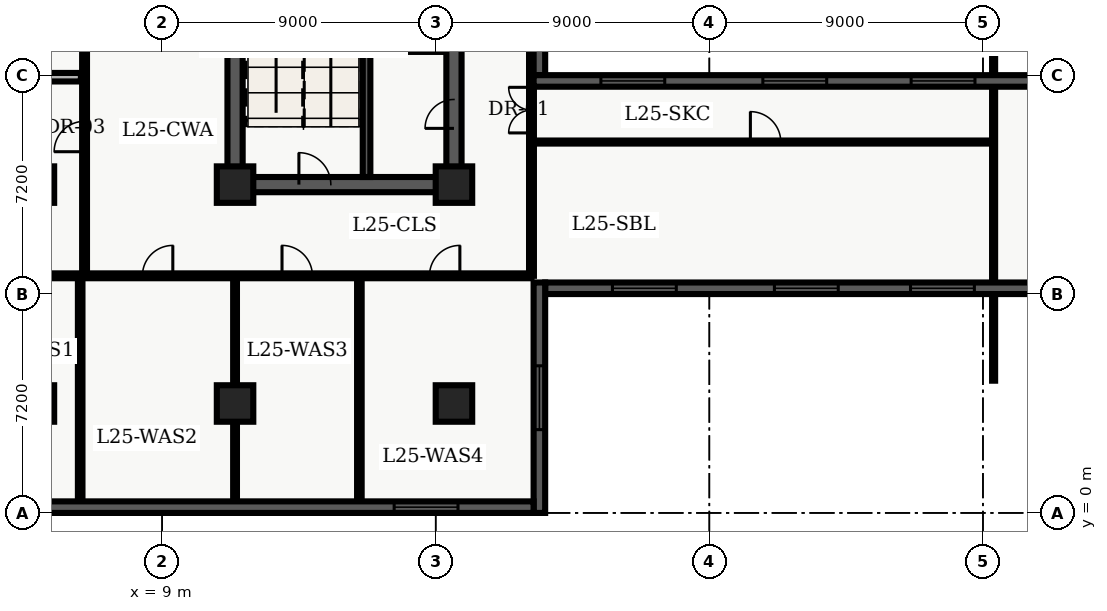
"""IFC4 building model, lengths in metres.
Left out: names, types, materials, properties, quantities, classifications, styles, units other than length and angle.
Written with IfcOpenShell. Run it as: python <this file> out.ifc"""

import sys

from ifc_helpers import new_model, entity, si_unit, converted_unit, direction, frame, origin_with_axes, origin_2d_with_axis, place, context, subcontext, project, spatial, polyline, rectangle, outline, extrude, element, fill, save


model = new_model("IFC4")
c1 = context("Model", 3, precision=1e-05, world=origin_with_axes(), true_north=direction((0.0, 1.0)))
c2 = subcontext(c1, "Body", "Model", "MODEL_VIEW")
j1 = project(units=[si_unit("LENGTHUNIT", "METRE"), converted_unit("PLANEANGLEUNIT", "DEGREE", entity("IfcPlaneAngleMeasure", 0.017), si_unit("PLANEANGLEUNIT", "RADIAN"), dimensions=[0, 0, 0, 0, 0, 0, 0])], contexts=[c1])
p1 = place(None, origin_with_axes())
s1 = spatial("IfcSite", under=j1, at=p1, CompositionType="ELEMENT")
p2 = place(p1, origin_with_axes())
s2 = spatial("IfcBuilding", under=s1, at=p2, CompositionType="ELEMENT")
p3 = place(p2, frame((0.0, 0.0, 104.7), z_axis=(0.0, 0.0, 1.0), x_axis=(1.0, 0.0, 0.0)))
s3 = spatial("IfcBuildingStorey", under=s2, at=p3, CompositionType="ELEMENT", Elevation=104.7)
p4 = place(p3, frame((11.4, 10.8, 0.0), z_axis=(0.0, 0.0, 1.0), x_axis=(0.0, 1.0, 0.0)))
e1 = element("IfcWall", 1, at=p4, inside=s3, PredefinedType="SHEAR", context=c2, shape_type="SweptSolid", body=[
    extrude(outline(polyline([(0.0, -0.25), (27.0, -0.25), (27.0, 0.25), (0.0, 0.25), (0.0, -0.25)])), origin_with_axes(), (0.0, 0.0, 1.0), 3.66),
])
p5 = place(p3, frame((11.4, 10.8, 0.0), z_axis=(0.0, 0.0, 1.0), x_axis=(1.0, 0.0, 0.0)))
e2 = element("IfcWall", 2, at=p5, inside=s3, PredefinedType="SHEAR", context=c2, shape_type="SweptSolid", body=[
    extrude(outline(polyline([(0.0, -0.25), (7.2, -0.25), (7.2, 0.25), (0.0, 0.25), (0.0, -0.25)])), origin_with_axes(), (0.0, 0.0, 1.0), 3.66),
])
p6 = place(p5, frame((2.625, 0.0, 0.0), z_axis=(0.0, 0.0, 1.0), x_axis=(1.0, 0.0, 0.0)))
e3 = element("IfcOpeningElement", 3, at=p6, cuts=e2, PredefinedType="OPENING", context=c2, shape_type="SweptSolid", body=[
    extrude(rectangle(XDim=1.05, YDim=0.52, at=origin_2d_with_axis()), origin_with_axes(), (0.0, 0.0, 1.0), 2.15),
])
p7 = place(p3, frame((18.6, 10.8, 0.0), z_axis=(0.0, 0.0, 1.0), x_axis=(0.0, 1.0, 0.0)))
e4 = element("IfcWall", 4, at=p7, inside=s3, PredefinedType="SHEAR", context=c2, shape_type="SweptSolid", body=[
    extrude(outline(polyline([(0.0, -0.25), (13.5, -0.25), (13.5, 0.25), (0.0, 0.25), (0.0, -0.25)])), origin_with_axes(), (0.0, 0.0, 1.0), 3.66),
])
p8 = place(p7, frame((11.125, 0.0, 0.0), z_axis=(0.0, 0.0, 1.0), x_axis=(1.0, 0.0, 0.0)))
e5 = element("IfcOpeningElement", 5, at=p8, cuts=e4, PredefinedType="OPENING", context=c2, shape_type="SweptSolid", body=[
    extrude(rectangle(XDim=1.05, YDim=0.52, at=origin_2d_with_axis()), origin_with_axes(), (0.0, 0.0, 1.0), 2.15),
])
p9 = place(p7, frame((2.325, 0.0, 0.0), z_axis=(0.0, 0.0, 1.0), x_axis=(1.0, 0.0, 0.0)))
e6 = element("IfcOpeningElement", 6, at=p9, cuts=e4, PredefinedType="OPENING", context=c2, shape_type="SweptSolid", body=[
    extrude(rectangle(XDim=0.95, YDim=0.52, at=origin_2d_with_axis()), origin_with_axes(), (0.0, 0.0, 1.0), 2.15),
])
p10 = place(p3, frame((15.725, 11.05, 0.0), z_axis=(0.0, 0.0, 1.0), x_axis=(0.0, 1.0, 0.0)))
e7 = element("IfcWall", 7, at=p10, inside=s3, PredefinedType="SHEAR", context=c2, shape_type="SweptSolid", body=[
    extrude(outline(polyline([(0.0, -0.125), (8.65, -0.125), (8.65, 0.125), (0.0, 0.125), (0.0, -0.125)])), origin_with_axes(), (0.0, 0.0, 1.0), 3.66),
])
for number, where, z_axis, x_axis in (
    (8, (11.4, 3.6, 0.0), (0.0, 0.0, 1.0), (1.0, 0.0, 0.0)),
    (9, (11.4, 10.8, 0.0), (0.0, 0.0, 1.0), (1.0, 0.0, 0.0)),
    (10, (18.6, 3.6, 0.0), (0.0, 0.0, 1.0), (1.0, 0.0, 0.0)),
    (11, (18.6, 10.8, 0.0), (0.0, 0.0, 1.0), (1.0, 0.0, 0.0)),
    (12, (4.85, 3.6, 0.0), (0.0, 0.0, 1.0), (1.0, 0.0, 0.0)),
    (13, (4.85, 10.8, 0.0), (0.0, 0.0, 1.0), (1.0, 0.0, 0.0)),
):
    element("IfcColumn", number, at=place(p3, frame(where, z_axis=z_axis, x_axis=x_axis)), inside=s3, PredefinedType="COLUMN", context=c2, shape_type="SweptSolid", body=[
        extrude(rectangle(XDim=1.2, YDim=1.2, at=origin_2d_with_axis()), origin_with_axes(), (0.0, 0.0, 1.0), 3.9),
    ])
p11 = place(p3, frame((2.6, 7.8, 0.0), z_axis=(0.0, 0.0, 1.0), x_axis=(1.0, 0.0, 0.0)))
e14 = element("IfcWall", 14, at=p11, inside=s3, PredefinedType="PARTITIONING", context=c2, shape_type="SweptSolid", body=[
    extrude(outline(polyline([(0.0, -0.08), (18.55, -0.08), (18.55, 0.08), (0.0, 0.08), (0.0, -0.08)])), origin_with_axes(), (0.0, 0.0, 1.0), 2.7),
])
p12 = place(p11, frame((1.848, 0.0, 0.0), z_axis=(0.0, 0.0, 1.0), x_axis=(1.0, 0.0, 0.0)))
e15 = element("IfcOpeningElement", 15, at=p12, cuts=e14, PredefinedType="OPENING", context=c2, shape_type="SweptSolid", body=[
    extrude(rectangle(XDim=1.0, YDim=0.18, at=origin_2d_with_axis()), origin_with_axes(), (0.0, 0.0, 1.0), 2.15),
])
p13 = place(p11, frame((6.253, 0.0, 0.0), z_axis=(0.0, 0.0, 1.0), x_axis=(1.0, 0.0, 0.0)))
e16 = element("IfcOpeningElement", 16, at=p13, cuts=e14, PredefinedType="OPENING", context=c2, shape_type="SweptSolid", body=[
    extrude(rectangle(XDim=1.0, YDim=0.18, at=origin_2d_with_axis()), origin_with_axes(), (0.0, 0.0, 1.0), 2.15),
])
p14 = place(p11, frame((10.845, 0.0, 0.0), z_axis=(0.0, 0.0, 1.0), x_axis=(1.0, 0.0, 0.0)))
e17 = element("IfcOpeningElement", 17, at=p14, cuts=e14, PredefinedType="OPENING", context=c2, shape_type="SweptSolid", body=[
    extrude(rectangle(XDim=1.0, YDim=0.18, at=origin_2d_with_axis()), origin_with_axes(), (0.0, 0.0, 1.0), 2.15),
])
p15 = place(p11, frame((15.694, 0.0, 0.0), z_axis=(0.0, 0.0, 1.0), x_axis=(1.0, 0.0, 0.0)))
e18 = element("IfcOpeningElement", 18, at=p15, cuts=e14, PredefinedType="OPENING", context=c2, shape_type="SweptSolid", body=[
    extrude(rectangle(XDim=1.0, YDim=0.18, at=origin_2d_with_axis()), origin_with_axes(), (0.0, 0.0, 1.0), 2.15),
])
p16 = place(p3, frame((21.15, 7.8, 0.0), z_axis=(0.0, 0.0, 1.0), x_axis=(0.0, 1.0, 0.0)))
e19 = element("IfcWall", 19, at=p16, inside=s3, PredefinedType="PARTITIONING", context=c2, shape_type="SweptSolid", body=[
    extrude(outline(polyline([(0.0, -0.08), (32.7, -0.08), (32.7, 0.08), (0.0, 0.08), (0.0, -0.08)])), origin_with_axes(), (0.0, 0.0, 1.0), 2.7),
])
p17 = place(p16, frame((5.45, 0.0, 0.0), z_axis=(0.0, 0.0, 1.0), x_axis=(1.0, 0.0, 0.0)))
e20 = element("IfcOpeningElement", 20, at=p17, cuts=e19, PredefinedType="OPENING", context=c2, shape_type="SweptSolid", body=[
    extrude(rectangle(XDim=1.5, YDim=0.18, at=origin_2d_with_axis()), origin_with_axes(), (0.0, 0.0, 1.0), 2.2),
])
p18 = place(p3, frame((6.45, 7.8, 0.0), z_axis=(0.0, 0.0, 1.0), x_axis=(0.0, 1.0, 0.0)))
e21 = element("IfcWall", 21, at=p18, inside=s3, PredefinedType="PARTITIONING", context=c2, shape_type="SweptSolid", body=[
    extrude(outline(polyline([(0.0, -0.08), (32.7, -0.08), (32.7, 0.08), (0.0, 0.08), (0.0, -0.08)])), origin_with_axes(), (0.0, 0.0, 1.0), 2.7),
])
p19 = place(p18, frame((4.582, 0.0, 0.0), z_axis=(0.0, 0.0, 1.0), x_axis=(1.0, 0.0, 0.0)))
e22 = element("IfcOpeningElement", 22, at=p19, cuts=e21, PredefinedType="OPENING", context=c2, shape_type="SweptSolid", body=[
    extrude(rectangle(XDim=1.0, YDim=0.18, at=origin_2d_with_axis()), origin_with_axes(), (0.0, 0.0, 1.0), 2.15),
])
p20 = place(p18, frame((10.304, 0.0, 0.0), z_axis=(0.0, 0.0, 1.0), x_axis=(1.0, 0.0, 0.0)))
e23 = element("IfcOpeningElement", 23, at=p20, cuts=e21, PredefinedType="OPENING", context=c2, shape_type="SweptSolid", body=[
    extrude(rectangle(XDim=1.0, YDim=0.18, at=origin_2d_with_axis()), origin_with_axes(), (0.0, 0.0, 1.0), 2.15),
])
p21 = place(p18, frame((18.512, 0.0, 0.0), z_axis=(0.0, 0.0, 1.0), x_axis=(1.0, 0.0, 0.0)))
e24 = element("IfcOpeningElement", 24, at=p21, cuts=e21, PredefinedType="OPENING", context=c2, shape_type="SweptSolid", body=[
    extrude(rectangle(XDim=1.0, YDim=0.18, at=origin_2d_with_axis()), origin_with_axes(), (0.0, 0.0, 1.0), 2.15),
])
p22 = place(p18, frame((25.142, 0.0, 0.0), z_axis=(0.0, 0.0, 1.0), x_axis=(1.0, 0.0, 0.0)))
e25 = element("IfcOpeningElement", 25, at=p22, cuts=e21, PredefinedType="OPENING", context=c2, shape_type="SweptSolid", body=[
    extrude(rectangle(XDim=1.0, YDim=0.18, at=origin_2d_with_axis()), origin_with_axes(), (0.0, 0.0, 1.0), 2.15),
])
p23 = place(p18, frame((31.602, 0.0, 0.0), z_axis=(0.0, 0.0, 1.0), x_axis=(1.0, 0.0, 0.0)))
e26 = element("IfcOpeningElement", 26, at=p23, cuts=e21, PredefinedType="OPENING", context=c2, shape_type="SweptSolid", body=[
    extrude(rectangle(XDim=1.0, YDim=0.18, at=origin_2d_with_axis()), origin_with_axes(), (0.0, 0.0, 1.0), 2.15),
])
p24 = place(p3, frame((0.375, 14.333, 0.0), z_axis=(0.0, 0.0, 1.0), x_axis=(1.0, 0.0, 0.0)))
e27 = element("IfcWall", 27, at=p24, inside=s3, PredefinedType="PARTITIONING", context=c2, shape_type="SweptSolid", body=[
    extrude(outline(polyline([(0.0, -0.14), (5.955, -0.14), (5.955, 0.14), (0.0, 0.14), (0.0, -0.14)])), origin_with_axes(), (0.0, 0.0, 1.0), 2.7),
])
p25 = place(p3, frame((6.306, 0.36, 0.0), z_axis=(0.0, 0.0, 1.0), x_axis=(0.0, 1.0, 0.0)))
e28 = element("IfcWall", 28, at=p25, inside=s3, PredefinedType="PARTITIONING", context=c2, shape_type="SweptSolid", body=[
    extrude(outline(polyline([(0.0, -0.075), (7.34, -0.075), (7.34, 0.075), (0.0, 0.075), (0.0, -0.075)])), origin_with_axes(), (0.0, 0.0, 1.0), 2.7),
])
p26 = place(p3, frame((11.4, 0.36, 0.0), z_axis=(0.0, 0.0, 1.0), x_axis=(0.0, 1.0, 0.0)))
e29 = element("IfcWall", 29, at=p26, inside=s3, PredefinedType="PARTITIONING", context=c2, shape_type="SweptSolid", body=[
    extrude(outline(polyline([(0.0, -0.062), (7.34, -0.062), (7.34, 0.062), (0.0, 0.062), (0.0, -0.062)])), origin_with_axes(), (0.0, 0.0, 1.0), 2.7),
])
p27 = place(p3, frame((15.489, 0.36, 0.0), z_axis=(0.0, 0.0, 1.0), x_axis=(0.0, 1.0, 0.0)))
e30 = element("IfcWall", 30, at=p27, inside=s3, PredefinedType="PARTITIONING", context=c2, shape_type="SweptSolid", body=[
    extrude(outline(polyline([(0.0, -0.075), (7.34, -0.075), (7.34, 0.075), (0.0, 0.075), (0.0, -0.075)])), origin_with_axes(), (0.0, 0.0, 1.0), 2.7),
])
p28 = place(p3, frame((21.15, 12.2, 0.0), z_axis=(0.0, 0.0, 1.0), x_axis=(1.0, 0.0, 0.0)))
e31 = element("IfcWall", 31, at=p28, inside=s3, PredefinedType="PARTITIONING", context=c2, shape_type="SweptSolid", body=[
    extrude(outline(polyline([(0.0, -0.05), (15.2, -0.05), (15.2, 0.05), (0.0, 0.05), (0.0, -0.05)])), origin_with_axes(), (0.0, 0.0, 1.0), 2.7),
])
p29 = place(p28, frame((7.7, 0.0, 0.0), z_axis=(0.0, 0.0, 1.0), x_axis=(1.0, 0.0, 0.0)))
e32 = element("IfcOpeningElement", 32, at=p29, cuts=e31, PredefinedType="OPENING", context=c2, shape_type="SweptSolid", body=[
    extrude(rectangle(XDim=1.0, YDim=0.12, at=origin_2d_with_axis()), origin_with_axes(), (0.0, 0.0, 1.0), 2.15),
])
p30 = place(p3, frame((36.35, 4.35, 0.0), z_axis=(0.0, 0.0, 1.0), x_axis=(0.0, 1.0, 0.0)))
e33 = element("IfcWall", 33, at=p30, inside=s3, PredefinedType="PARTITIONING", context=c2, shape_type="SweptSolid", body=[
    extrude(outline(polyline([(0.0, -0.05), (22.2, -0.05), (22.2, 0.05), (0.0, 0.05), (0.0, -0.05)])), origin_with_axes(), (0.0, 0.0, 1.0), 2.7),
])
p31 = place(p3, frame((38.78, 7.39, 0.0), z_axis=(0.0, 0.0, 1.0), x_axis=(-1.0, 0.0, 0.0)))
e34 = element("IfcWall", 34, at=p31, inside=s3, PredefinedType="SOLIDWALL", context=c2, shape_type="SweptSolid", body=[
    extrude(outline(polyline([(0.0, -0.19), (17.18, -0.19), (17.18, 0.19), (0.0, 0.19), (0.0, -0.19)])), origin_with_axes(), (0.0, 0.0, 1.0), 3.66),
])
p32 = place(p31, frame((4.113, 0.0, 0.45), z_axis=(0.0, 0.0, 1.0), x_axis=(1.0, 0.0, 0.0)))
e35 = element("IfcOpeningElement", 35, at=p32, cuts=e34, PredefinedType="OPENING", context=c2, shape_type="SweptSolid", body=[
    extrude(rectangle(XDim=2.1, YDim=0.4, at=origin_2d_with_axis()), origin_with_axes(), (0.0, 0.0, 1.0), 2.2),
])
p33 = place(p31, frame((8.59, 0.0, 0.45), z_axis=(0.0, 0.0, 1.0), x_axis=(1.0, 0.0, 0.0)))
e36 = element("IfcOpeningElement", 36, at=p33, cuts=e34, PredefinedType="OPENING", context=c2, shape_type="SweptSolid", body=[
    extrude(rectangle(XDim=2.1, YDim=0.4, at=origin_2d_with_axis()), origin_with_axes(), (0.0, 0.0, 1.0), 2.2),
])
p34 = place(p31, frame((13.917, 0.0, 0.45), z_axis=(0.0, 0.0, 1.0), x_axis=(1.0, 0.0, 0.0)))
e37 = element("IfcOpeningElement", 37, at=p34, cuts=e34, PredefinedType="OPENING", context=c2, shape_type="SweptSolid", body=[
    extrude(rectangle(XDim=2.1, YDim=0.4, at=origin_2d_with_axis()), origin_with_axes(), (0.0, 0.0, 1.0), 2.2),
])
p35 = place(p3, frame((21.41, 7.58, 0.0), z_axis=(0.0, 0.0, 1.0), x_axis=(0.0, -1.0, 0.0)))
e38 = element("IfcWall", 38, at=p35, inside=s3, PredefinedType="SOLIDWALL", context=c2, shape_type="SweptSolid", body=[
    extrude(outline(polyline([(0.0, -0.19), (7.58, -0.19), (7.58, 0.19), (0.0, 0.19), (0.0, -0.19)])), origin_with_axes(), (0.0, 0.0, 1.0), 3.66),
])
p36 = place(p35, frame((3.79, 0.0, 0.45), z_axis=(0.0, 0.0, 1.0), x_axis=(1.0, 0.0, 0.0)))
e39 = element("IfcOpeningElement", 39, at=p36, cuts=e38, PredefinedType="OPENING", context=c2, shape_type="SweptSolid", body=[
    extrude(rectangle(XDim=2.1, YDim=0.4, at=origin_2d_with_axis()), origin_with_axes(), (0.0, 0.0, 1.0), 2.2),
])
p37 = place(p3, frame((21.22, 0.19, 0.0), z_axis=(0.0, 0.0, 1.0), x_axis=(-1.0, 0.0, 0.0)))
e40 = element("IfcWall", 40, at=p37, inside=s3, PredefinedType="SOLIDWALL", context=c2, shape_type="SweptSolid", body=[
    extrude(outline(polyline([(0.0, -0.19), (18.82, -0.19), (18.82, 0.19), (0.0, 0.19), (0.0, -0.19)])), origin_with_axes(), (0.0, 0.0, 1.0), 3.66),
])
p38 = place(p37, frame((3.537, 0.0, 0.45), z_axis=(0.0, 0.0, 1.0), x_axis=(1.0, 0.0, 0.0)))
e41 = element("IfcOpeningElement", 41, at=p38, cuts=e40, PredefinedType="OPENING", context=c2, shape_type="SweptSolid", body=[
    extrude(rectangle(XDim=2.1, YDim=0.4, at=origin_2d_with_axis()), origin_with_axes(), (0.0, 0.0, 1.0), 2.2),
])
p39 = place(p3, frame((21.41, 31.65, 0.0), z_axis=(0.0, 0.0, 1.0), x_axis=(0.0, -1.0, 0.0)))
e42 = element("IfcWall", 42, at=p39, inside=s3, PredefinedType="SOLIDWALL", context=c2, shape_type="SweptSolid", body=[
    extrude(outline(polyline([(0.0, -0.19), (17.25, -0.19), (17.25, 0.19), (0.0, 0.19), (0.0, -0.19)])), origin_with_axes(), (0.0, 0.0, 1.0), 3.66),
])
p40 = place(p3, frame((21.22, 14.21, 0.0), z_axis=(0.0, 0.0, 1.0), x_axis=(1.0, 0.0, 0.0)))
e43 = element("IfcWall", 43, at=p40, inside=s3, PredefinedType="SOLIDWALL", context=c2, shape_type="SweptSolid", body=[
    extrude(outline(polyline([(0.0, -0.19), (17.18, -0.19), (17.18, 0.19), (0.0, 0.19), (0.0, -0.19)])), origin_with_axes(), (0.0, 0.0, 1.0), 3.66),
])
p41 = place(p40, frame((3.263, 0.0, 0.45), z_axis=(0.0, 0.0, 1.0), x_axis=(1.0, 0.0, 0.0)))
e44 = element("IfcOpeningElement", 44, at=p41, cuts=e43, PredefinedType="OPENING", context=c2, shape_type="SweptSolid", body=[
    extrude(rectangle(XDim=2.1, YDim=0.4, at=origin_2d_with_axis()), origin_with_axes(), (0.0, 0.0, 1.0), 2.2),
])
p42 = place(p40, frame((8.59, 0.0, 0.45), z_axis=(0.0, 0.0, 1.0), x_axis=(1.0, 0.0, 0.0)))
e45 = element("IfcOpeningElement", 45, at=p42, cuts=e43, PredefinedType="OPENING", context=c2, shape_type="SweptSolid", body=[
    extrude(rectangle(XDim=2.1, YDim=0.4, at=origin_2d_with_axis()), origin_with_axes(), (0.0, 0.0, 1.0), 2.2),
])
p43 = place(p40, frame((13.467, 0.0, 0.45), z_axis=(0.0, 0.0, 1.0), x_axis=(1.0, 0.0, 0.0)))
e46 = element("IfcOpeningElement", 46, at=p43, cuts=e43, PredefinedType="OPENING", context=c2, shape_type="SweptSolid", body=[
    extrude(rectangle(XDim=2.1, YDim=0.4, at=origin_2d_with_axis()), origin_with_axes(), (0.0, 0.0, 1.0), 2.2),
])
p44 = place(p5, frame((2.625, 0.0, 0.0), z_axis=(0.0, 0.0, 1.0), x_axis=(1.0, 0.0, 0.0)))
e47 = element("IfcDoor", 47, at=p44, inside=s3, OperationType="SINGLE_SWING_LEFT", PredefinedType="DOOR", context=c2, shape_type="SweptSolid", body=[
    extrude(rectangle(XDim=1.05, YDim=0.09, at=origin_2d_with_axis()), origin_with_axes(), (0.0, 0.0, 1.0), 2.15),
])
fill(e3, e47)
p45 = place(p7, frame((2.325, 0.0, 0.0), z_axis=(0.0, 0.0, 1.0), x_axis=(1.0, 0.0, 0.0)))
e48 = element("IfcDoor", 48, at=p45, inside=s3, OperationType="SINGLE_SWING_LEFT", PredefinedType="DOOR", context=c2, shape_type="SweptSolid", body=[
    extrude(rectangle(XDim=0.95, YDim=0.09, at=origin_2d_with_axis()), origin_with_axes(), (0.0, 0.0, 1.0), 2.15),
])
fill(e6, e48)
p46 = place(p18, frame((4.582, 0.0, 0.0), z_axis=(0.0, 0.0, 1.0), x_axis=(1.0, 0.0, 0.0)))
e49 = element("IfcDoor", 49, at=p46, inside=s3, OperationType="SINGLE_SWING_LEFT", PredefinedType="DOOR", context=c2, shape_type="SweptSolid", body=[
    extrude(rectangle(XDim=1.0, YDim=0.09, at=origin_2d_with_axis()), origin_with_axes(), (0.0, 0.0, 1.0), 2.15),
])
fill(e22, e49)
p47 = place(p11, frame((6.253, 0.0, 0.0), z_axis=(0.0, 0.0, 1.0), x_axis=(1.0, 0.0, 0.0)))
e50 = element("IfcDoor", 50, at=p47, inside=s3, OperationType="SINGLE_SWING_RIGHT", PredefinedType="DOOR", context=c2, shape_type="SweptSolid", body=[
    extrude(rectangle(XDim=1.0, YDim=0.09, at=origin_2d_with_axis()), origin_with_axes(), (0.0, 0.0, 1.0), 2.15),
])
fill(e16, e50)
p48 = place(p11, frame((10.845, 0.0, 0.0), z_axis=(0.0, 0.0, 1.0), x_axis=(1.0, 0.0, 0.0)))
e51 = element("IfcDoor", 51, at=p48, inside=s3, OperationType="SINGLE_SWING_LEFT", PredefinedType="DOOR", context=c2, shape_type="SweptSolid", body=[
    extrude(rectangle(XDim=1.0, YDim=0.09, at=origin_2d_with_axis()), origin_with_axes(), (0.0, 0.0, 1.0), 2.15),
])
fill(e17, e51)
p49 = place(p11, frame((15.694, 0.0, 0.0), z_axis=(0.0, 0.0, 1.0), x_axis=(1.0, 0.0, 0.0)))
e52 = element("IfcDoor", 52, at=p49, inside=s3, OperationType="SINGLE_SWING_RIGHT", PredefinedType="DOOR", context=c2, shape_type="SweptSolid", body=[
    extrude(rectangle(XDim=1.0, YDim=0.09, at=origin_2d_with_axis()), origin_with_axes(), (0.0, 0.0, 1.0), 2.15),
])
fill(e18, e52)
p50 = place(p16, frame((5.45, 0.0, 0.0), z_axis=(0.0, 0.0, 1.0), x_axis=(1.0, 0.0, 0.0)))
e53 = element("IfcDoor", 53, at=p50, inside=s3, OperationType="DOUBLE_DOOR_SINGLE_SWING", PredefinedType="DOOR", context=c2, shape_type="SweptSolid", body=[
    extrude(rectangle(XDim=1.5, YDim=0.09, at=origin_2d_with_axis()), origin_with_axes(), (0.0, 0.0, 1.0), 2.2),
])
fill(e20, e53)
p51 = place(p28, frame((7.7, 0.0, 0.0), z_axis=(0.0, 0.0, 1.0), x_axis=(1.0, 0.0, 0.0)))
e54 = element("IfcDoor", 54, at=p51, inside=s3, OperationType="SINGLE_SWING_LEFT", PredefinedType="DOOR", context=c2, shape_type="SweptSolid", body=[
    extrude(rectangle(XDim=1.0, YDim=0.06, at=origin_2d_with_axis()), origin_with_axes(), (0.0, 0.0, 1.0), 2.15),
])
fill(e32, e54)
p52 = place(p31, frame((4.113, 0.0, 0.45), z_axis=(0.0, 0.0, 1.0), x_axis=(1.0, 0.0, 0.0)))
e55 = element("IfcWindow", 55, at=p52, inside=s3, PredefinedType="WINDOW", context=c2, shape_type="SweptSolid", body=[
    extrude(rectangle(XDim=2.1, YDim=0.09, at=origin_2d_with_axis()), origin_with_axes(), (0.0, 0.0, 1.0), 2.2),
])
fill(e35, e55)
p53 = place(p31, frame((8.59, 0.0, 0.45), z_axis=(0.0, 0.0, 1.0), x_axis=(1.0, 0.0, 0.0)))
e56 = element("IfcWindow", 56, at=p53, inside=s3, PredefinedType="WINDOW", context=c2, shape_type="SweptSolid", body=[
    extrude(rectangle(XDim=2.1, YDim=0.09, at=origin_2d_with_axis()), origin_with_axes(), (0.0, 0.0, 1.0), 2.2),
])
fill(e36, e56)
p54 = place(p31, frame((13.917, 0.0, 0.45), z_axis=(0.0, 0.0, 1.0), x_axis=(1.0, 0.0, 0.0)))
e57 = element("IfcWindow", 57, at=p54, inside=s3, PredefinedType="WINDOW", context=c2, shape_type="SweptSolid", body=[
    extrude(rectangle(XDim=2.1, YDim=0.09, at=origin_2d_with_axis()), origin_with_axes(), (0.0, 0.0, 1.0), 2.2),
])
fill(e37, e57)
p55 = place(p35, frame((3.79, 0.0, 0.45), z_axis=(0.0, 0.0, 1.0), x_axis=(1.0, 0.0, 0.0)))
e58 = element("IfcWindow", 58, at=p55, inside=s3, PredefinedType="WINDOW", context=c2, shape_type="SweptSolid", body=[
    extrude(rectangle(XDim=2.1, YDim=0.09, at=origin_2d_with_axis()), origin_with_axes(), (0.0, 0.0, 1.0), 2.2),
])
fill(e39, e58)
p56 = place(p37, frame((3.537, 0.0, 0.45), z_axis=(0.0, 0.0, 1.0), x_axis=(1.0, 0.0, 0.0)))
e59 = element("IfcWindow", 59, at=p56, inside=s3, PredefinedType="WINDOW", context=c2, shape_type="SweptSolid", body=[
    extrude(rectangle(XDim=2.1, YDim=0.09, at=origin_2d_with_axis()), origin_with_axes(), (0.0, 0.0, 1.0), 2.2),
])
fill(e41, e59)
p57 = place(p40, frame((3.263, 0.0, 0.45), z_axis=(0.0, 0.0, 1.0), x_axis=(1.0, 0.0, 0.0)))
e60 = element("IfcWindow", 60, at=p57, inside=s3, PredefinedType="WINDOW", context=c2, shape_type="SweptSolid", body=[
    extrude(rectangle(XDim=2.1, YDim=0.09, at=origin_2d_with_axis()), origin_with_axes(), (0.0, 0.0, 1.0), 2.2),
])
fill(e44, e60)
p58 = place(p40, frame((8.59, 0.0, 0.45), z_axis=(0.0, 0.0, 1.0), x_axis=(1.0, 0.0, 0.0)))
e61 = element("IfcWindow", 61, at=p58, inside=s3, PredefinedType="WINDOW", context=c2, shape_type="SweptSolid", body=[
    extrude(rectangle(XDim=2.1, YDim=0.09, at=origin_2d_with_axis()), origin_with_axes(), (0.0, 0.0, 1.0), 2.2),
])
fill(e45, e61)
p59 = place(p40, frame((13.467, 0.0, 0.45), z_axis=(0.0, 0.0, 1.0), x_axis=(1.0, 0.0, 0.0)))
e62 = element("IfcWindow", 62, at=p59, inside=s3, PredefinedType="WINDOW", context=c2, shape_type="SweptSolid", body=[
    extrude(rectangle(XDim=2.1, YDim=0.09, at=origin_2d_with_axis()), origin_with_axes(), (0.0, 0.0, 1.0), 2.2),
])
fill(e46, e62)
save(model, sys.argv[1])
